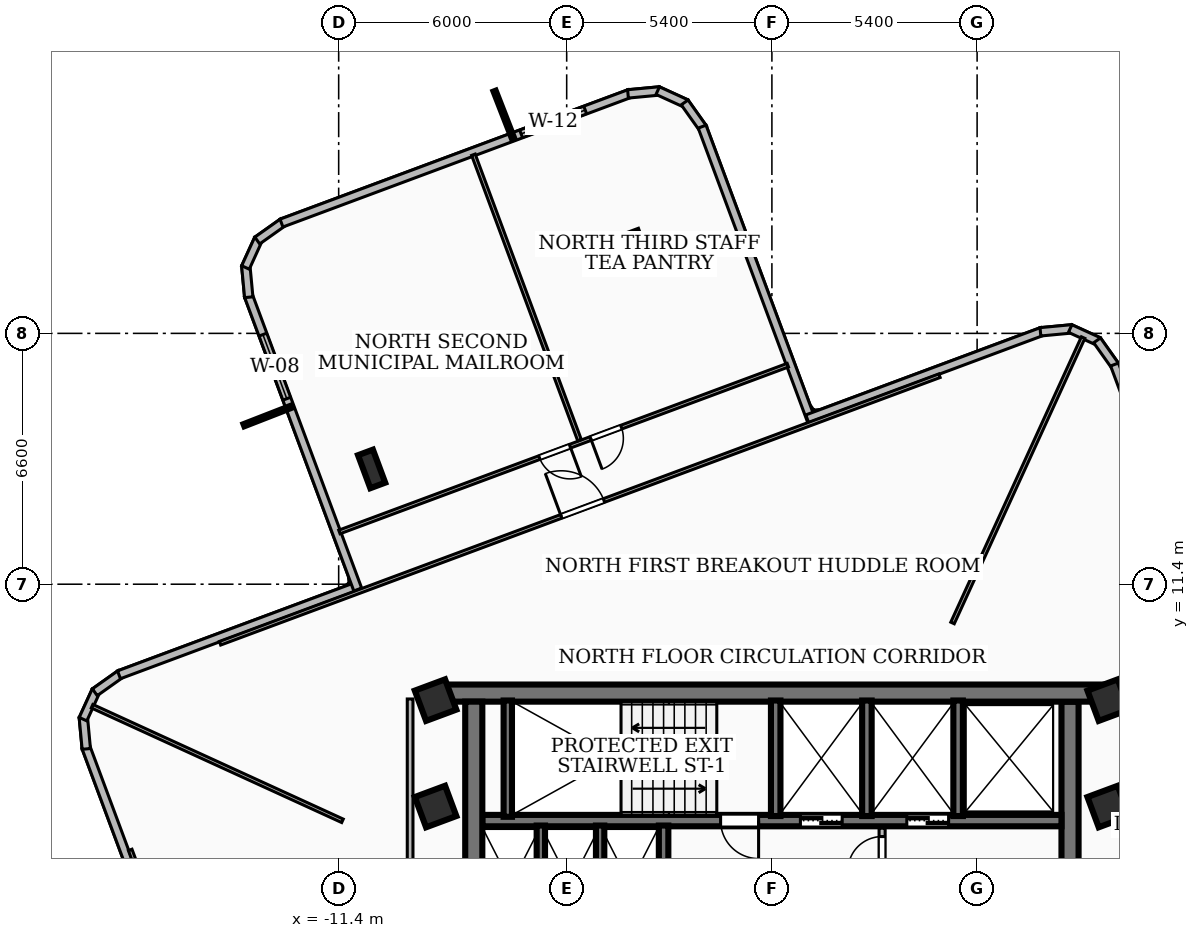
"""IFC4 building model, lengths in metres.
Left out: names, types, materials, properties, quantities, classifications, styles, units other than length and angle.
Written with IfcOpenShell. Run it as: python <this file> out.ifc"""

import sys

from ifc_helpers import new_model, si_unit, direction, frame, frame_2d, origin, origin_2d, place, context, subcontext, project, spatial, rectangle, i_section, extrude, element, fill, save


model = new_model("IFC4")
c1 = context("Model", 3, precision=1e-05, world=origin(), true_north=direction((0.0, 1.0)))
c2 = subcontext(c1, "Body", "Model", "MODEL_VIEW")
j1 = project(units=[si_unit("LENGTHUNIT", "METRE"), si_unit("PLANEANGLEUNIT", "RADIAN")], contexts=[c1])
p1 = place(None, origin())
s1 = spatial("IfcSite", under=j1, at=p1, CompositionType="ELEMENT")
p2 = place(p1, origin())
s2 = spatial("IfcBuilding", under=s1, at=p2, CompositionType="ELEMENT")
p3 = place(p2, frame((0.0, 0.0, 166.68)))
s3 = spatial("IfcBuildingStorey", under=s2, at=p3, CompositionType="ELEMENT", Elevation=166.68)
p4 = place(p3, frame((-8.78, 8.535, 0.0), z_axis=(0.0, 0.0, 1.0), x_axis=(1.0, 0.0, 0.0)))
e1 = element("IfcWall", 1, at=p4, inside=s3, PredefinedType="SHEAR", context=c2, shape_type="SweptSolid", body=[
    extrude(rectangle(XDim=17.56, YDim=0.45, at=frame_2d((8.78, 0.0))), origin(), (0.0, 0.0, 1.0), 3.34),
])
for number, where, z_axis, x_axis in (
    (2, (-7.845, 1.975, 0.0), (0.0, 0.0, 1.0), (0.0, 1.0, 0.0)),
    (3, (7.845, 8.31, 0.0), (0.0, 0.0, 1.0), (0.0, -1.0, 0.0)),
):
    element("IfcWall", number, at=place(p3, frame(where, z_axis=z_axis, x_axis=x_axis)), inside=s3, PredefinedType="SHEAR", context=c2, shape_type="SweptSolid", body=[
        extrude(rectangle(XDim=6.335, YDim=0.45, at=frame_2d((3.167, 0.0))), origin(), (0.0, 0.0, 1.0), 3.34),
    ])
p5 = place(p3, frame((7.62, 5.18, 0.0), z_axis=(0.0, 0.0, 1.0), x_axis=(-1.0, 0.0, 0.0)))
e4 = element("IfcWall", 4, at=p5, inside=s3, PredefinedType="SOLIDWALL", context=c2, shape_type="SweptSolid", body=[
    extrude(rectangle(XDim=15.24, YDim=0.3, at=frame_2d((7.62, 0.0))), origin(), (0.0, 0.0, 1.0), 3.34),
])
p6 = place(p5, frame((5.77, 0.0, 0.0)))
e5 = element("IfcOpeningElement", 5, at=p6, cuts=e4, PredefinedType="OPENING", context=c2, shape_type="SweptSolid", body=[
    extrude(rectangle(XDim=1.1, YDim=2.15, at=frame_2d((0.55, 1.075))), frame((0.0, 0.16, 0.0), z_axis=(0.0, -1.0, 0.0), x_axis=(1.0, 0.0, 0.0)), (0.0, 0.0, 1.0), 0.32),
])
p7 = place(p5, frame((2.97, 0.0, 0.0)))
e6 = element("IfcOpeningElement", 6, at=p7, cuts=e4, PredefinedType="OPENING", context=c2, shape_type="SweptSolid", body=[
    extrude(rectangle(XDim=1.1, YDim=2.15, at=frame_2d((0.55, 1.075))), frame((0.0, 0.16, 0.0), z_axis=(0.0, -1.0, 0.0), x_axis=(1.0, 0.0, 0.0)), (0.0, 0.0, 1.0), 0.32),
])
p8 = place(p5, frame((7.97, 0.0, 0.0)))
e7 = element("IfcOpeningElement", 7, at=p8, cuts=e4, PredefinedType="OPENING", context=c2, shape_type="SweptSolid", body=[
    extrude(rectangle(XDim=1.0, YDim=2.1, at=frame_2d((0.5, 1.05))), frame((0.0, 0.16, 0.0), z_axis=(0.0, -1.0, 0.0), x_axis=(1.0, 0.0, 0.0)), (0.0, 0.0, 1.0), 0.32),
])
p9 = place(p3, frame((-6.95, 5.28, 0.0), z_axis=(0.0, 0.0, 1.0), x_axis=(0.0, 1.0, 0.0)))
e8 = element("IfcWall", 8, at=p9, inside=s3, PredefinedType="SOLIDWALL", context=c2, shape_type="SweptSolid", body=[
    extrude(rectangle(XDim=3.06, YDim=0.22, at=frame_2d((1.53, 0.0))), origin(), (0.0, 0.0, 1.0), 3.34),
])
for number, where, z_axis, x_axis in (
    (9, (0.1, 5.3, 0.0), (0.0, 0.0, 1.0), (0.0, 1.0, 0.0)),
    (10, (2.5, 5.3, 0.0), (0.0, 0.0, 1.0), (0.0, 1.0, 0.0)),
    (11, (4.9, 5.3, 0.0), (0.0, 0.0, 1.0), (0.0, 1.0, 0.0)),
):
    element("IfcWall", number, at=place(p3, frame(where, z_axis=z_axis, x_axis=x_axis)), inside=s3, PredefinedType="SOLIDWALL", context=c2, shape_type="SweptSolid", body=[
        extrude(rectangle(XDim=3.04, YDim=0.25, at=frame_2d((1.52, 0.0))), origin(), (0.0, 0.0, 1.0), 3.34),
    ])
p10 = place(p3, frame((-2.85, 1.98, 0.0), z_axis=(0.0, 0.0, 1.0), x_axis=(0.0, 1.0, 0.0)))
e12 = element("IfcWall", 12, at=p10, inside=s3, PredefinedType="SOLIDWALL", context=c2, shape_type="SweptSolid", body=[
    extrude(rectangle(XDim=3.07, YDim=0.25, at=frame_2d((1.535, 0.0))), origin(), (0.0, 0.0, 1.0), 3.34),
])
for number, where, z_axis, x_axis in (
    (13, (-6.08, 1.98, 0.0), (0.0, 0.0, 1.0), (0.0, 1.0, 0.0)),
    (14, (-4.52, 1.98, 0.0), (0.0, 0.0, 1.0), (0.0, 1.0, 0.0)),
):
    element("IfcWall", number, at=place(p3, frame(where, z_axis=z_axis, x_axis=x_axis)), inside=s3, PredefinedType="SOLIDWALL", context=c2, shape_type="SweptSolid", body=[
        extrude(rectangle(XDim=3.07, YDim=0.22, at=frame_2d((1.535, 0.0))), origin(), (0.0, 0.0, 1.0), 3.34),
    ])
for number, where, z_axis, x_axis in (
    (15, (-8.85, 5.55, 0.0), (0.0, 0.0, 1.0), (0.937, 0.349, 0.0)),
    (16, (8.85, 5.55, 0.0), (0.0, 0.0, 1.0), (0.937, 0.349, 0.0)),
    (17, (-8.85, 8.35, 0.0), (0.0, 0.0, 1.0), (0.937, 0.349, 0.0)),
    (18, (8.85, 8.35, 0.0), (0.0, 0.0, 1.0), (0.937, 0.349, 0.0)),
):
    element("IfcColumn", number, at=place(p3, frame(where, z_axis=z_axis, x_axis=x_axis)), inside=s3, PredefinedType="COLUMN", context=c2, shape_type="SweptSolid", body=[
        extrude(rectangle(XDim=0.85, YDim=0.85, at=origin_2d()), origin(), (0.0, 0.0, 1.0), 3.6),
    ])
for number, where, z_axis, x_axis in (
    (19, (-3.57, 20.207, 0.0), (0.0, 0.0, 1.0), (0.937, 0.349, 0.0)),
    (20, (-10.533, 14.433, 0.0), (0.0, 0.0, 1.0), (0.937, 0.349, 0.0)),
):
    element("IfcColumn", number, at=place(p3, frame(where, z_axis=z_axis, x_axis=x_axis)), inside=s3, PredefinedType="COLUMN", context=c2, shape_type="SweptSolid", body=[
        extrude(i_section(OverallWidth=0.418, OverallDepth=0.927, WebThickness=0.019, FlangeThickness=0.032, at=origin_2d()), origin(), (0.0, 0.0, 1.0), 3.6),
    ])
p11 = place(p3, frame((-15.751, 0.93, 0.0), z_axis=(0.0, 0.0, 1.0), x_axis=(-0.348729932868, 0.937223257246, 0.0)))
e21 = element("IfcWall", 21, at=p11, inside=s3, PredefinedType="SOLIDWALL", context=c2, shape_type="SweptSolid", body=[
    extrude(rectangle(XDim=6.598, YDim=0.22, at=frame_2d((3.299, 0.0))), origin(), (0.0, 0.0, 1.0), 3.34),
])
p12 = place(p3, frame((-18.041, 7.066, 0.0), z_axis=(0.0, 0.0, 1.0), x_axis=(-0.09330446586, 0.995637623159, 0.0)))
e22 = element("IfcWall", 22, at=p12, inside=s3, PredefinedType="SOLIDWALL", context=c2, shape_type="SweptSolid", body=[
    extrude(rectangle(XDim=0.835, YDim=0.22, at=frame_2d((0.417, 0.0))), origin(), (0.0, 0.0, 1.0), 3.34),
])
p13 = place(p3, frame((-18.127, 7.849, 0.0), z_axis=(0.0, 0.0, 1.0), x_axis=(0.415083126143, 0.909783489843, 0.0)))
e23 = element("IfcWall", 23, at=p13, inside=s3, PredefinedType="SOLIDWALL", context=c2, shape_type="SweptSolid", body=[
    extrude(rectangle(XDim=0.819, YDim=0.22, at=frame_2d((0.409, 0.0))), origin(), (0.0, 0.0, 1.0), 3.34),
])
p14 = place(p3, frame((-17.817, 8.557, 0.0), z_axis=(0.0, 0.0, 1.0), x_axis=(0.815315167698, 0.579017424022, 0.0)))
e24 = element("IfcWall", 24, at=p14, inside=s3, PredefinedType="SOLIDWALL", context=c2, shape_type="SweptSolid", body=[
    extrude(rectangle(XDim=0.833, YDim=0.22, at=frame_2d((0.417, 0.0))), origin(), (0.0, 0.0, 1.0), 3.34),
])
p15 = place(p3, frame((-17.181, 9.016, 0.0), z_axis=(0.0, 0.0, 1.0), x_axis=(0.937216908499, 0.34874699486, 0.0)))
e25 = element("IfcWall", 25, at=p15, inside=s3, PredefinedType="SOLIDWALL", context=c2, shape_type="SweptSolid", body=[
    extrude(rectangle(XDim=6.758, YDim=0.22, at=frame_2d((3.379, 0.0))), origin(), (0.0, 0.0, 1.0), 3.34),
])
p16 = place(p3, frame((-10.898, 11.26, 0.0), z_axis=(0.0, 0.0, 1.0), x_axis=(-0.348682373258, 0.937240952252, 0.0)))
e26 = element("IfcWall", 26, at=p16, inside=s3, PredefinedType="SOLIDWALL", context=c2, shape_type="SweptSolid", body=[
    extrude(rectangle(XDim=8.257, YDim=0.22, at=frame_2d((4.129, 0.0))), origin(), (0.0, 0.0, 1.0), 3.34),
])
p17 = place(p16, frame((5.357, 0.0, 0.85)))
e27 = element("IfcOpeningElement", 27, at=p17, cuts=e26, PredefinedType="OPENING", context=c2, shape_type="SweptSolid", body=[
    extrude(rectangle(XDim=1.8, YDim=1.8, at=frame_2d((0.9, 0.9))), frame((0.0, 0.12, 0.0), z_axis=(0.0, -1.0, 0.0), x_axis=(1.0, 0.0, 0.0)), (0.0, 0.0, 1.0), 0.24),
])
p18 = place(p3, frame((-13.766, 18.951, 0.0), z_axis=(0.0, 0.0, 1.0), x_axis=(-0.09330446586, 0.995637623159, 0.0)))
e28 = element("IfcWall", 28, at=p18, inside=s3, PredefinedType="SOLIDWALL", context=c2, shape_type="SweptSolid", body=[
    extrude(rectangle(XDim=0.835, YDim=0.22, at=frame_2d((0.417, 0.0))), origin(), (0.0, 0.0, 1.0), 3.34),
])
p19 = place(p3, frame((-13.852, 19.734, 0.0), z_axis=(0.0, 0.0, 1.0), x_axis=(0.41476734413, 0.909927497245, 0.0)))
e29 = element("IfcWall", 29, at=p19, inside=s3, PredefinedType="SOLIDWALL", context=c2, shape_type="SweptSolid", body=[
    extrude(rectangle(XDim=0.82, YDim=0.22, at=frame_2d((0.41, 0.0))), origin(), (0.0, 0.0, 1.0), 3.34),
])
p20 = place(p3, frame((-13.542, 20.443, 0.0), z_axis=(0.0, 0.0, 1.0), x_axis=(0.815845967165, 0.578269277984, 0.0)))
e30 = element("IfcWall", 30, at=p20, inside=s3, PredefinedType="SOLIDWALL", context=c2, shape_type="SweptSolid", body=[
    extrude(rectangle(XDim=0.833, YDim=0.22, at=frame_2d((0.417, 0.0))), origin(), (0.0, 0.0, 1.0), 3.34),
])
p21 = place(p3, frame((-12.905, 20.902, 0.0), z_axis=(0.0, 0.0, 1.0), x_axis=(0.937245188143, 0.348670987183, 0.0)))
e31 = element("IfcWall", 31, at=p21, inside=s3, PredefinedType="SOLIDWALL", context=c2, shape_type="SweptSolid", body=[
    extrude(rectangle(XDim=9.78, YDim=0.22, at=frame_2d((4.89, 0.0))), origin(), (0.0, 0.0, 1.0), 3.34),
])
p22 = place(p21, frame((6.728, 0.0, 0.85)))
e32 = element("IfcOpeningElement", 32, at=p22, cuts=e31, PredefinedType="OPENING", context=c2, shape_type="SweptSolid", body=[
    extrude(rectangle(XDim=1.8, YDim=1.6, at=frame_2d((0.9, 0.8))), frame((0.0, 0.12, 0.0), z_axis=(0.0, -1.0, 0.0), x_axis=(1.0, 0.0, 0.0)), (0.0, 0.0, 1.0), 0.24),
])
p23 = place(p3, frame((-3.787, 24.301, 0.0), z_axis=(0.0, 0.0, 1.0), x_axis=(0.995637623159, 0.09330446586, 0.0)))
e33 = element("IfcWall", 33, at=p23, inside=s3, PredefinedType="SOLIDWALL", context=c2, shape_type="SweptSolid", body=[
    extrude(rectangle(XDim=0.835, YDim=0.22, at=frame_2d((0.417, 0.0))), origin(), (0.0, 0.0, 1.0), 3.34),
])
p24 = place(p3, frame((-3.004, 24.387, 0.0), z_axis=(0.0, 0.0, 1.0), x_axis=(0.909783489843, -0.415083126143, 0.0)))
e34 = element("IfcWall", 34, at=p24, inside=s3, PredefinedType="SOLIDWALL", context=c2, shape_type="SweptSolid", body=[
    extrude(rectangle(XDim=0.819, YDim=0.22, at=frame_2d((0.409, 0.0))), origin(), (0.0, 0.0, 1.0), 3.34),
])
p25 = place(p3, frame((-2.296, 24.077, 0.0), z_axis=(0.0, 0.0, 1.0), x_axis=(0.579048422224, -0.815293152626, 0.0)))
e35 = element("IfcWall", 35, at=p25, inside=s3, PredefinedType="SOLIDWALL", context=c2, shape_type="SweptSolid", body=[
    extrude(rectangle(XDim=0.834, YDim=0.22, at=frame_2d((0.417, 0.0))), origin(), (0.0, 0.0, 1.0), 3.34),
])
p26 = place(p3, frame((-1.836, 23.44, 0.0), z_axis=(0.0, 0.0, 1.0), x_axis=(0.348617756986, -0.937264988952, 0.0)))
e36 = element("IfcWall", 36, at=p26, inside=s3, PredefinedType="SOLIDWALL", context=c2, shape_type="SweptSolid", body=[
    extrude(rectangle(XDim=8.258, YDim=0.22, at=frame_2d((4.129, 0.0))), origin(), (0.0, 0.0, 1.0), 2.644),
])
p27 = place(p3, frame((0.93, 15.751, 0.0), z_axis=(0.0, 0.0, 1.0), x_axis=(0.937223257246, 0.348729932868, 0.0)))
e37 = element("IfcWall", 37, at=p27, inside=s3, PredefinedType="SOLIDWALL", context=c2, shape_type="SweptSolid", body=[
    extrude(rectangle(XDim=6.598, YDim=0.22, at=frame_2d((3.299, 0.0))), origin(), (0.0, 0.0, 1.0), 2.644),
])
p28 = place(p3, frame((7.066, 18.041, 0.0), z_axis=(0.0, 0.0, 1.0), x_axis=(0.995637623159, 0.09330446586, 0.0)))
e38 = element("IfcWall", 38, at=p28, inside=s3, PredefinedType="SOLIDWALL", context=c2, shape_type="SweptSolid", body=[
    extrude(rectangle(XDim=0.835, YDim=0.22, at=frame_2d((0.417, 0.0))), origin(), (0.0, 0.0, 1.0), 3.34),
])
p29 = place(p3, frame((7.849, 18.127, 0.0), z_axis=(0.0, 0.0, 1.0), x_axis=(0.909783489843, -0.415083126143, 0.0)))
e39 = element("IfcWall", 39, at=p29, inside=s3, PredefinedType="SOLIDWALL", context=c2, shape_type="SweptSolid", body=[
    extrude(rectangle(XDim=0.819, YDim=0.22, at=frame_2d((0.409, 0.0))), origin(), (0.0, 0.0, 1.0), 3.34),
])
p30 = place(p3, frame((8.557, 17.817, 0.0), z_axis=(0.0, 0.0, 1.0), x_axis=(0.579017424022, -0.815315167698, 0.0)))
e40 = element("IfcWall", 40, at=p30, inside=s3, PredefinedType="SOLIDWALL", context=c2, shape_type="SweptSolid", body=[
    extrude(rectangle(XDim=0.833, YDim=0.22, at=frame_2d((0.417, 0.0))), origin(), (0.0, 0.0, 1.0), 3.34),
])
p31 = place(p3, frame((9.016, 17.181, 0.0), z_axis=(0.0, 0.0, 1.0), x_axis=(0.34874699486, -0.937216908499, 0.0)))
e41 = element("IfcWall", 41, at=p31, inside=s3, PredefinedType="SOLIDWALL", context=c2, shape_type="SweptSolid", body=[
    extrude(rectangle(XDim=6.758, YDim=0.22, at=frame_2d((3.379, 0.0))), origin(), (0.0, 0.0, 1.0), 2.644),
])
p32 = place(p3, frame((2.9, 2.04, 0.0), z_axis=(0.0, 0.0, 1.0), x_axis=(0.0, 1.0, 0.0)))
e42 = element("IfcWall", 42, at=p32, inside=s3, PredefinedType="PARTITIONING", context=c2, shape_type="SweptSolid", body=[
    extrude(rectangle(XDim=2.94, YDim=0.16, at=frame_2d((1.47, 0.0))), origin(), (0.0, 0.0, 1.0), 2.57),
])
p33 = place(p32, frame((1.82, 0.0, 0.0)))
e43 = element("IfcOpeningElement", 43, at=p33, cuts=e42, PredefinedType="OPENING", context=c2, shape_type="SweptSolid", body=[
    extrude(rectangle(XDim=0.9, YDim=2.06, at=frame_2d((0.45, 1.03))), frame((0.0, 0.09, 0.0), z_axis=(0.0, -1.0, 0.0), x_axis=(1.0, 0.0, 0.0)), (0.0, 0.0, 1.0), 0.18),
])
p34 = place(p3, frame((-9.52, 1.75, 0.0), z_axis=(0.0, 0.0, 1.0), x_axis=(0.0, 1.0, 0.0)))
e44 = element("IfcWall", 44, at=p34, inside=s3, PredefinedType="PARTITIONING", context=c2, shape_type="SweptSolid", body=[
    extrude(rectangle(XDim=6.63, YDim=0.15, at=frame_2d((3.315, 0.0))), origin(), (0.0, 0.0, 1.0), 3.34),
])
p35 = place(p3, frame((4.753, 10.38, 0.0), z_axis=(0.0, 0.0, 1.0), x_axis=(0.416191484634, 0.909276991966, 0.0)))
e45 = element("IfcWall", 45, at=p35, inside=s3, PredefinedType="PARTITIONING", context=c2, shape_type="SweptSolid", body=[
    extrude(rectangle(XDim=8.258, YDim=0.1, at=frame_2d((4.129, 0.0))), origin(), (0.0, 0.0, 1.0), 2.644),
])
p36 = place(p3, frame((-11.3, 5.174, 0.0), z_axis=(0.0, 0.0, 1.0), x_axis=(-0.909275268701, 0.416195249528, 0.0)))
e46 = element("IfcWall", 46, at=p36, inside=s3, PredefinedType="PARTITIONING", context=c2, shape_type="SweptSolid", body=[
    extrude(rectangle(XDim=7.246, YDim=0.1, at=frame_2d((3.623, 0.0))), origin(), (0.0, 0.0, 1.0), 3.34),
])
p37 = place(p3, frame((-14.522, 9.846, 0.0), z_axis=(0.0, 0.0, 1.0), x_axis=(0.937292757866, 0.348543090668, 0.0)))
e47 = element("IfcWall", 47, at=p37, inside=s3, PredefinedType="PARTITIONING", context=c2, shape_type="SweptSolid", body=[
    extrude(rectangle(XDim=20.198, YDim=0.1, at=frame_2d((10.099, 0.0))), origin(), (0.0, 0.0, 1.0), 2.644),
])
p38 = place(p37, frame((9.579, 0.0, 0.0)))
e48 = element("IfcOpeningElement", 48, at=p38, cuts=e47, PredefinedType="OPENING", context=c2, shape_type="SweptSolid", body=[
    extrude(rectangle(XDim=1.2, YDim=2.1, at=frame_2d((0.6, 1.05))), frame((0.0, 0.06, 0.0), z_axis=(0.0, -1.0, 0.0), x_axis=(1.0, 0.0, 0.0)), (0.0, 0.0, 1.0), 0.12),
])
p39 = place(p3, frame((-5.062, 15.188, 0.0), z_axis=(0.0, 0.0, 1.0), x_axis=(-0.348454946531, 0.937325530559, 0.0)))
e49 = element("IfcWall", 49, at=p39, inside=s3, PredefinedType="PARTITIONING", context=c2, shape_type="SweptSolid", body=[
    extrude(rectangle(XDim=8.015, YDim=0.1, at=frame_2d((4.008, 0.0))), origin(), (0.0, 0.0, 1.0), 2.644),
])
p40 = place(p3, frame((0.419, 17.163, 0.0), z_axis=(0.0, 0.0, 1.0), x_axis=(-0.937262231235, -0.348625171066, 0.0)))
e50 = element("IfcWall", 50, at=p40, inside=s3, PredefinedType="PARTITIONING", context=c2, shape_type="SweptSolid", body=[
    extrude(rectangle(XDim=12.59, YDim=0.1, at=frame_2d((6.295, 0.0))), origin(), (0.0, 0.0, 1.0), 2.644),
])
p41 = place(p40, frame((4.675, 0.0, 0.0)))
e51 = element("IfcOpeningElement", 51, at=p41, cuts=e50, PredefinedType="OPENING", context=c2, shape_type="SweptSolid", body=[
    extrude(rectangle(XDim=0.86, YDim=2.04, at=frame_2d((0.43, 1.02))), frame((0.0, 0.06, 0.0), z_axis=(0.0, -1.0, 0.0), x_axis=(1.0, 0.0, 0.0)), (0.0, 0.0, 1.0), 0.12),
])
p42 = place(p40, frame((6.115, 0.0, 0.0)))
e52 = element("IfcOpeningElement", 52, at=p42, cuts=e50, PredefinedType="OPENING", context=c2, shape_type="SweptSolid", body=[
    extrude(rectangle(XDim=0.86, YDim=2.04, at=frame_2d((0.43, 1.02))), frame((0.0, 0.06, 0.0), z_axis=(0.0, -1.0, 0.0), x_axis=(1.0, 0.0, 0.0)), (0.0, 0.0, 1.0), 0.12),
])
p43 = place(p3, frame((-9.846, -14.522, 0.0), z_axis=(0.0, 0.0, 1.0), x_axis=(-0.348543090668, 0.937292757866, 0.0)))
e53 = element("IfcWall", 53, at=p43, inside=s3, PredefinedType="PARTITIONING", context=c2, shape_type="SweptSolid", body=[
    extrude(rectangle(XDim=20.198, YDim=0.1, at=frame_2d((10.099, 0.0))), origin(), (0.0, 0.0, 1.0), 2.644),
])
p44 = place(p43, frame((9.579, 0.0, 0.0)))
e54 = element("IfcOpeningElement", 54, at=p44, cuts=e53, PredefinedType="OPENING", context=c2, shape_type="SweptSolid", body=[
    extrude(rectangle(XDim=1.2, YDim=2.1, at=frame_2d((0.6, 1.05))), frame((0.0, 0.06, 0.0), z_axis=(0.0, -1.0, 0.0), x_axis=(1.0, 0.0, 0.0)), (0.0, 0.0, 1.0), 0.12),
])
p45 = place(p17, origin())
e55 = element("IfcWindow", 55, at=p45, inside=s3, PartitioningType="SINGLE_PANEL", PredefinedType="WINDOW", context=c2, shape_type="SweptSolid", body=[
    extrude(rectangle(XDim=1.8, YDim=1.8, at=frame_2d((0.9, 0.9))), frame((0.0, 0.03, 0.0), z_axis=(0.0, -1.0, 0.0), x_axis=(1.0, 0.0, 0.0)), (0.0, 0.0, 1.0), 0.06),
])
fill(e27, e55)
p46 = place(p22, origin())
e56 = element("IfcWindow", 56, at=p46, inside=s3, PartitioningType="SINGLE_PANEL", PredefinedType="WINDOW", context=c2, shape_type="SweptSolid", body=[
    extrude(rectangle(XDim=1.8, YDim=1.6, at=frame_2d((0.9, 0.8))), frame((0.0, 0.03, 0.0), z_axis=(0.0, -1.0, 0.0), x_axis=(1.0, 0.0, 0.0)), (0.0, 0.0, 1.0), 0.06),
])
fill(e32, e56)
p47 = place(p6, origin())
e57 = element("IfcDoor", 57, at=p47, inside=s3, OperationType="DOUBLE_DOOR_SLIDING", PredefinedType="DOOR", context=c2, shape_type="SweptSolid", body=[
    extrude(rectangle(XDim=1.1, YDim=2.15, at=frame_2d((0.55, 1.075))), frame((0.0, 0.025, 0.0), z_axis=(0.0, -1.0, 0.0), x_axis=(1.0, 0.0, 0.0)), (0.0, 0.0, 1.0), 0.05),
])
fill(e5, e57)
p48 = place(p7, origin())
e58 = element("IfcDoor", 58, at=p48, inside=s3, OperationType="DOUBLE_DOOR_SLIDING", PredefinedType="DOOR", context=c2, shape_type="SweptSolid", body=[
    extrude(rectangle(XDim=1.1, YDim=2.15, at=frame_2d((0.55, 1.075))), frame((0.0, 0.025, 0.0), z_axis=(0.0, -1.0, 0.0), x_axis=(1.0, 0.0, 0.0)), (0.0, 0.0, 1.0), 0.05),
])
fill(e6, e58)
p49 = place(p8, origin())
e59 = element("IfcDoor", 59, at=p49, inside=s3, OperationType="SINGLE_SWING_LEFT", PredefinedType="DOOR", context=c2, shape_type="SweptSolid", body=[
    extrude(rectangle(XDim=1.0, YDim=2.1, at=frame_2d((0.5, 1.05))), frame((0.0, 0.025, 0.0), z_axis=(0.0, -1.0, 0.0), x_axis=(1.0, 0.0, 0.0)), (0.0, 0.0, 1.0), 0.05),
])
fill(e7, e59)
p50 = place(p33, origin())
e60 = element("IfcDoor", 60, at=p50, inside=s3, OperationType="SINGLE_SWING_LEFT", PredefinedType="DOOR", context=c2, shape_type="SweptSolid", body=[
    extrude(rectangle(XDim=0.9, YDim=2.06, at=frame_2d((0.45, 1.03))), frame((0.0, 0.025, 0.0), z_axis=(0.0, -1.0, 0.0), x_axis=(1.0, 0.0, 0.0)), (0.0, 0.0, 1.0), 0.05),
])
fill(e43, e60)
p51 = place(p38, origin())
e61 = element("IfcDoor", 61, at=p51, inside=s3, OperationType="SINGLE_SWING_LEFT", PredefinedType="DOOR", context=c2, shape_type="SweptSolid", body=[
    extrude(rectangle(XDim=1.2, YDim=2.1, at=frame_2d((0.6, 1.05))), frame((0.0, 0.025, 0.0), z_axis=(0.0, -1.0, 0.0), x_axis=(1.0, 0.0, 0.0)), (0.0, 0.0, 1.0), 0.05),
])
fill(e48, e61)
p52 = place(p41, origin())
e62 = element("IfcDoor", 62, at=p52, inside=s3, OperationType="SINGLE_SWING_RIGHT", PredefinedType="DOOR", context=c2, shape_type="SweptSolid", body=[
    extrude(rectangle(XDim=0.86, YDim=2.04, at=frame_2d((0.43, 1.02))), frame((0.0, 0.025, 0.0), z_axis=(0.0, -1.0, 0.0), x_axis=(1.0, 0.0, 0.0)), (0.0, 0.0, 1.0), 0.05),
])
fill(e51, e62)
p53 = place(p42, origin())
e63 = element("IfcDoor", 63, at=p53, inside=s3, OperationType="SINGLE_SWING_LEFT", PredefinedType="DOOR", context=c2, shape_type="SweptSolid", body=[
    extrude(rectangle(XDim=0.86, YDim=2.04, at=frame_2d((0.43, 1.02))), frame((0.0, 0.025, 0.0), z_axis=(0.0, -1.0, 0.0), x_axis=(1.0, 0.0, 0.0)), (0.0, 0.0, 1.0), 0.05),
])
fill(e52, e63)
save(model, sys.argv[1])
